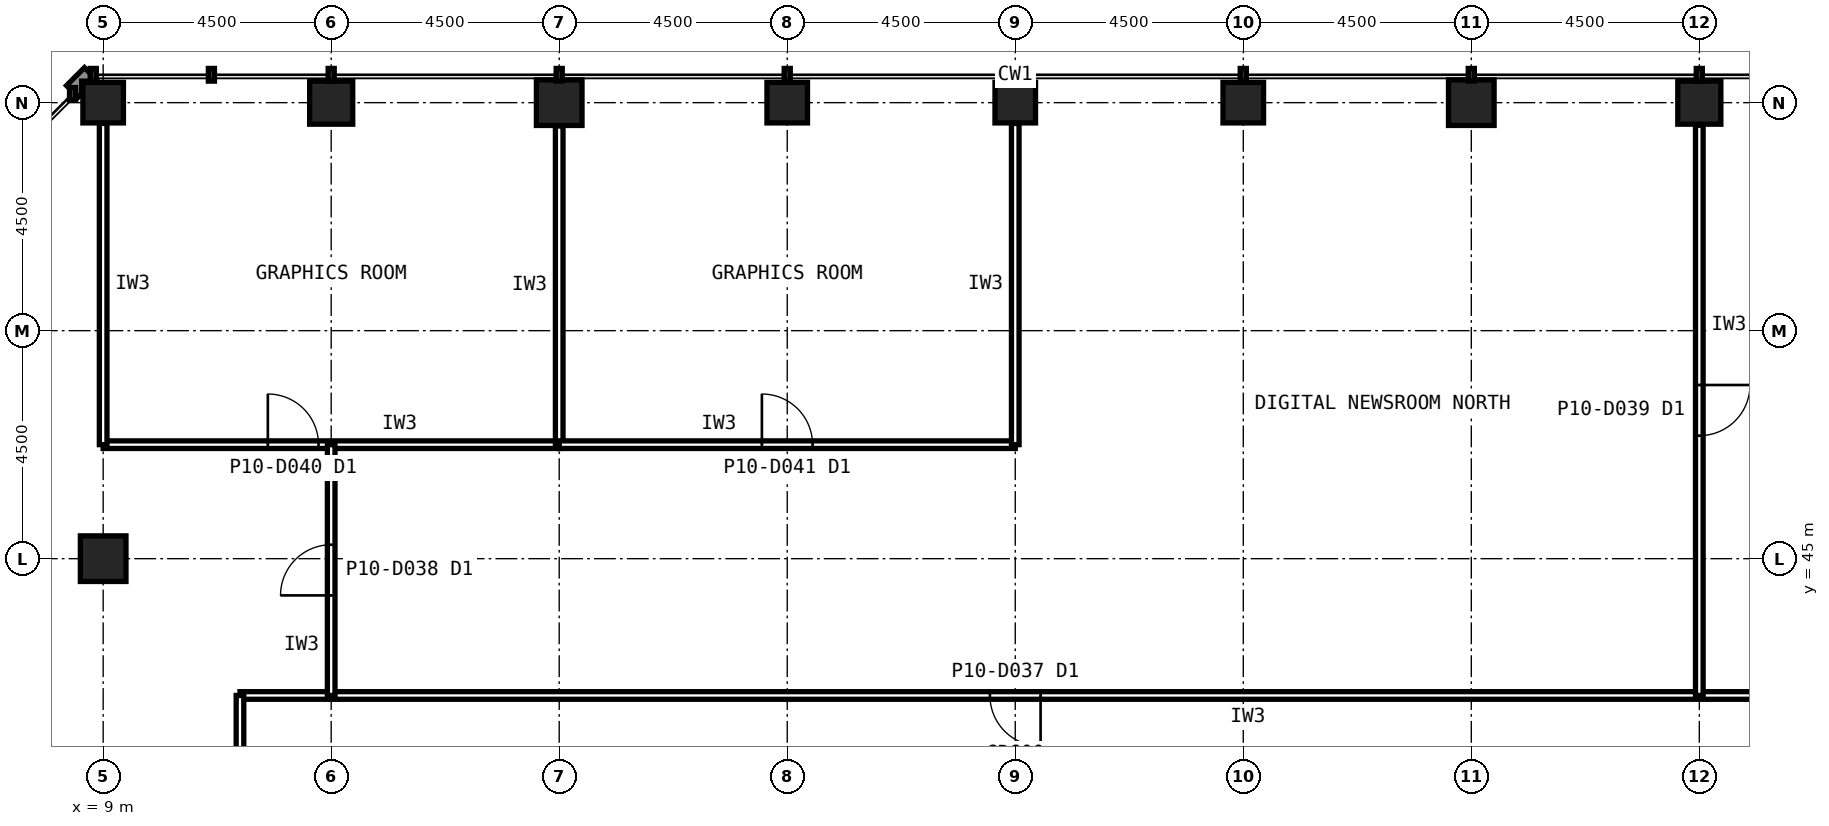
"""IFC4 building model, lengths in metres.
Left out: names, types, materials, properties, quantities, classifications, styles, units other than length and angle.
Written with IfcOpenShell. Run it as: python <this file> out.ifc"""

import sys

from ifc_helpers import new_model, si_unit, direction, frame, frame_2d, origin, origin_2d, place, context, subcontext, project, spatial, rectangle, hollow_rectangle, extrude, element, fill, save


model = new_model("IFC4")
c1 = context("Model", 3, precision=1e-05, world=origin(), true_north=direction((0.0, 1.0)))
c2 = subcontext(c1, "Body", "Model", "MODEL_VIEW")
j1 = project(units=[si_unit("LENGTHUNIT", "METRE"), si_unit("PLANEANGLEUNIT", "RADIAN")], contexts=[c1])
p1 = place(None, origin())
s1 = spatial("IfcSite", under=j1, at=p1, CompositionType="ELEMENT")
p2 = place(p1, origin())
s2 = spatial("IfcBuilding", under=s1, at=p2, CompositionType="ELEMENT")
p3 = place(p2, frame((0.0, 0.0, 45.8)))
s3 = spatial("IfcBuildingStorey", under=s2, at=p3, CompositionType="ELEMENT", Elevation=45.8)
p4 = place(p3, frame((40.5, 54.0, 0.0), z_axis=(0.0, 0.0, 1.0), x_axis=(1.0, 0.0, 0.0)))
e1 = element("IfcColumn", 1, at=p4, inside=s3, PredefinedType="COLUMN", context=c2, shape_type="SweptSolid", body=[
    extrude(hollow_rectangle(XDim=0.85, YDim=0.85, WallThickness=0.05, at=origin_2d()), origin(), (0.0, 0.0, 1.0), 4.2),
])
p5 = place(p3, frame((36.0, 54.0, 0.0), z_axis=(0.0, 0.0, 1.0), x_axis=(1.0, 0.0, 0.0)))
e2 = element("IfcColumn", 2, at=p5, inside=s3, PredefinedType="COLUMN", context=c2, shape_type="SweptSolid", body=[
    extrude(hollow_rectangle(XDim=0.9, YDim=0.9, WallThickness=0.063, at=origin_2d()), origin(), (0.0, 0.0, 1.0), 4.2),
])
for number, where, z_axis, x_axis in (
    (3, (31.5, 54.0, 0.0), (0.0, 0.0, 1.0), (1.0, 0.0, 0.0)),
    (4, (27.0, 54.0, 0.0), (0.0, 0.0, 1.0), (1.0, 0.0, 0.0)),
    (5, (22.5, 54.0, 0.0), (0.0, 0.0, 1.0), (1.0, 0.0, 0.0)),
):
    element("IfcColumn", number, at=place(p3, frame(where, z_axis=z_axis, x_axis=x_axis)), inside=s3, PredefinedType="COLUMN", context=c2, shape_type="SweptSolid", body=[
        extrude(hollow_rectangle(XDim=0.8, YDim=0.8, WallThickness=0.045, at=origin_2d()), origin(), (0.0, 0.0, 1.0), 4.2),
    ])
p6 = place(p3, frame((18.0, 54.0, 0.0), z_axis=(0.0, 0.0, 1.0), x_axis=(1.0, 0.0, 0.0)))
e6 = element("IfcColumn", 6, at=p6, inside=s3, PredefinedType="COLUMN", context=c2, shape_type="SweptSolid", body=[
    extrude(hollow_rectangle(XDim=0.9, YDim=0.9, WallThickness=0.063, at=origin_2d()), origin(), (0.0, 0.0, 1.0), 4.2),
])
p7 = place(p3, frame((13.5, 54.0, 0.0), z_axis=(0.0, 0.0, 1.0), x_axis=(1.0, 0.0, 0.0)))
e7 = element("IfcColumn", 7, at=p7, inside=s3, PredefinedType="COLUMN", context=c2, shape_type="SweptSolid", body=[
    extrude(hollow_rectangle(XDim=0.85, YDim=0.85, WallThickness=0.05, at=origin_2d()), origin(), (0.0, 0.0, 1.0), 4.2),
])
p8 = place(p3, frame((9.0, 54.0, 0.0), z_axis=(0.0, 0.0, 1.0), x_axis=(1.0, 0.0, 0.0)))
e8 = element("IfcColumn", 8, at=p8, inside=s3, PredefinedType="COLUMN", context=c2, shape_type="SweptSolid", body=[
    extrude(hollow_rectangle(XDim=0.8, YDim=0.8, WallThickness=0.045, at=origin_2d()), origin(), (0.0, 0.0, 1.0), 4.2),
])
p9 = place(p3, frame((9.0, 45.0, 0.0), z_axis=(0.0, 0.0, 1.0), x_axis=(1.0, 0.0, 0.0)))
e9 = element("IfcColumn", 9, at=p9, inside=s3, PredefinedType="COLUMN", context=c2, shape_type="SweptSolid", body=[
    extrude(hollow_rectangle(XDim=0.9, YDim=0.9, WallThickness=0.063, at=origin_2d()), origin(), (0.0, 0.0, 1.0), 4.2),
])
p10 = place(p3, frame((42.3, 42.3, 0.0), z_axis=(0.0, 0.0, 1.0), x_axis=(-1.0, 0.0, 0.0)))
e10 = element("IfcWall", 10, at=p10, inside=s3, PredefinedType="PARTITIONING", context=c2, shape_type="SweptSolid", body=[
    extrude(rectangle(XDim=30.6, YDim=0.15, at=frame_2d((15.3, 0.0))), origin(), (0.0, 0.0, 1.0), 4.04),
])
p11 = place(p10, frame((14.8, 0.0, 0.0)))
e11 = element("IfcOpeningElement", 11, at=p11, cuts=e10, PredefinedType="OPENING", context=c2, shape_type="SweptSolid", body=[
    extrude(rectangle(XDim=1.0, YDim=2.1, at=frame_2d((0.5, 1.05))), frame((0.0, 0.085, 0.0), z_axis=(0.0, -1.0, 0.0), x_axis=(1.0, 0.0, 0.0)), (0.0, 0.0, 1.0), 0.17),
])
p12 = place(p3, frame((11.7, 42.3, 0.0), z_axis=(0.0, 0.0, 1.0), x_axis=(0.0, -1.0, 0.0)))
e12 = element("IfcWall", 12, at=p12, inside=s3, PredefinedType="PARTITIONING", context=c2, shape_type="SweptSolid", body=[
    extrude(rectangle(XDim=9.0, YDim=0.15, at=frame_2d((4.5, 0.0))), origin(), (0.0, 0.0, 1.0), 4.04),
])
p13 = place(p3, frame((9.0, 47.25, 0.0), z_axis=(0.0, 0.0, 1.0), x_axis=(1.0, 0.0, 0.0)))
e13 = element("IfcWall", 13, at=p13, inside=s3, PredefinedType="PARTITIONING", context=c2, shape_type="SweptSolid", body=[
    extrude(rectangle(XDim=9.0, YDim=0.15, at=frame_2d((4.5, 0.0))), origin(), (0.0, 0.0, 1.0), 4.04),
])
p14 = place(p13, frame((3.25, 0.0, 0.0)))
e14 = element("IfcOpeningElement", 14, at=p14, cuts=e13, PredefinedType="OPENING", context=c2, shape_type="SweptSolid", body=[
    extrude(rectangle(XDim=1.0, YDim=2.1, at=frame_2d((0.5, 1.05))), frame((0.0, 0.085, 0.0), z_axis=(0.0, -1.0, 0.0), x_axis=(1.0, 0.0, 0.0)), (0.0, 0.0, 1.0), 0.17),
])
p15 = place(p3, frame((18.0, 47.25, 0.0), z_axis=(0.0, 0.0, 1.0), x_axis=(0.0, 1.0, 0.0)))
e15 = element("IfcWall", 15, at=p15, inside=s3, PredefinedType="PARTITIONING", context=c2, shape_type="SweptSolid", body=[
    extrude(rectangle(XDim=6.29, YDim=0.15, at=frame_2d((3.145, 0.0))), origin(), (0.0, 0.0, 1.0), 3.189),
])
p16 = place(p3, frame((9.0, 53.59, 0.0), z_axis=(0.0, 0.0, 1.0), x_axis=(0.0, -1.0, 0.0)))
e16 = element("IfcWall", 16, at=p16, inside=s3, PredefinedType="PARTITIONING", context=c2, shape_type="SweptSolid", body=[
    extrude(rectangle(XDim=6.34, YDim=0.15, at=frame_2d((3.17, 0.0))), origin(), (0.0, 0.0, 1.0), 3.429),
])
p17 = place(p3, frame((18.0, 47.25, 0.0), z_axis=(0.0, 0.0, 1.0), x_axis=(1.0, 0.0, 0.0)))
e17 = element("IfcWall", 17, at=p17, inside=s3, PredefinedType="PARTITIONING", context=c2, shape_type="SweptSolid", body=[
    extrude(rectangle(XDim=9.0, YDim=0.15, at=frame_2d((4.5, 0.0))), origin(), (0.0, 0.0, 1.0), 4.04),
])
p18 = place(p17, frame((4.0, 0.0, 0.0)))
e18 = element("IfcOpeningElement", 18, at=p18, cuts=e17, PredefinedType="OPENING", context=c2, shape_type="SweptSolid", body=[
    extrude(rectangle(XDim=1.0, YDim=2.1, at=frame_2d((0.5, 1.05))), frame((0.0, 0.085, 0.0), z_axis=(0.0, -1.0, 0.0), x_axis=(1.0, 0.0, 0.0)), (0.0, 0.0, 1.0), 0.17),
])
p19 = place(p3, frame((27.0, 47.25, 0.0), z_axis=(0.0, 0.0, 1.0), x_axis=(0.0, 1.0, 0.0)))
e19 = element("IfcWall", 19, at=p19, inside=s3, PredefinedType="PARTITIONING", context=c2, shape_type="SweptSolid", body=[
    extrude(rectangle(XDim=6.34, YDim=0.15, at=frame_2d((3.17, 0.0))), origin(), (0.0, 0.0, 1.0), 3.189),
])
p20 = place(p3, frame((40.5, 53.555, 0.0), z_axis=(0.0, 0.0, 1.0), x_axis=(0.0, -1.0, 0.0)))
e20 = element("IfcWall", 20, at=p20, inside=s3, PredefinedType="PARTITIONING", context=c2, shape_type="SweptSolid", body=[
    extrude(rectangle(XDim=11.255, YDim=0.15, at=frame_2d((5.627, 0.0))), origin(), (0.0, 0.0, 1.0), 3.189),
])
p21 = place(p20, frame((5.127, 0.0, 0.0)))
e21 = element("IfcOpeningElement", 21, at=p21, cuts=e20, PredefinedType="OPENING", context=c2, shape_type="SweptSolid", body=[
    extrude(rectangle(XDim=1.0, YDim=2.1, at=frame_2d((0.5, 1.05))), frame((0.0, 0.085, 0.0), z_axis=(0.0, -1.0, 0.0), x_axis=(1.0, 0.0, 0.0)), (0.0, 0.0, 1.0), 0.17),
])
p22 = place(p3, frame((13.5, 42.3, 0.0), z_axis=(0.0, 0.0, 1.0), x_axis=(0.0, 1.0, 0.0)))
e22 = element("IfcWall", 22, at=p22, inside=s3, PredefinedType="PARTITIONING", context=c2, shape_type="SweptSolid", body=[
    extrude(rectangle(XDim=4.95, YDim=0.15, at=frame_2d((2.475, 0.0))), origin(), (0.0, 0.0, 1.0), 3.189),
])
p23 = place(p22, frame((1.975, 0.0, 0.0)))
e23 = element("IfcOpeningElement", 23, at=p23, cuts=e22, PredefinedType="OPENING", context=c2, shape_type="SweptSolid", body=[
    extrude(rectangle(XDim=1.0, YDim=2.1, at=frame_2d((0.5, 1.05))), frame((0.0, 0.085, 0.0), z_axis=(0.0, -1.0, 0.0), x_axis=(1.0, 0.0, 0.0)), (0.0, 0.0, 1.0), 0.17),
])
p24 = place(p11, origin())
e24 = element("IfcDoor", 24, at=p24, inside=s3, OperationType="SINGLE_SWING_LEFT", PredefinedType="DOOR", context=c2, shape_type="SweptSolid", body=[
    extrude(rectangle(XDim=1.0, YDim=2.1, at=frame_2d((0.5, 1.05))), frame((0.0, 0.025, 0.0), z_axis=(0.0, -1.0, 0.0), x_axis=(1.0, 0.0, 0.0)), (0.0, 0.0, 1.0), 0.05),
])
fill(e11, e24)
p25 = place(p14, origin())
e25 = element("IfcDoor", 25, at=p25, inside=s3, OperationType="SINGLE_SWING_LEFT", PredefinedType="DOOR", context=c2, shape_type="SweptSolid", body=[
    extrude(rectangle(XDim=1.0, YDim=2.1, at=frame_2d((0.5, 1.05))), frame((0.0, 0.025, 0.0), z_axis=(0.0, -1.0, 0.0), x_axis=(1.0, 0.0, 0.0)), (0.0, 0.0, 1.0), 0.05),
])
fill(e14, e25)
p26 = place(p18, origin())
e26 = element("IfcDoor", 26, at=p26, inside=s3, OperationType="SINGLE_SWING_LEFT", PredefinedType="DOOR", context=c2, shape_type="SweptSolid", body=[
    extrude(rectangle(XDim=1.0, YDim=2.1, at=frame_2d((0.5, 1.05))), frame((0.0, 0.025, 0.0), z_axis=(0.0, -1.0, 0.0), x_axis=(1.0, 0.0, 0.0)), (0.0, 0.0, 1.0), 0.05),
])
fill(e18, e26)
p27 = place(p21, origin())
e27 = element("IfcDoor", 27, at=p27, inside=s3, OperationType="SINGLE_SWING_LEFT", PredefinedType="DOOR", context=c2, shape_type="SweptSolid", body=[
    extrude(rectangle(XDim=1.0, YDim=2.1, at=frame_2d((0.5, 1.05))), frame((0.0, 0.025, 0.0), z_axis=(0.0, -1.0, 0.0), x_axis=(1.0, 0.0, 0.0)), (0.0, 0.0, 1.0), 0.05),
])
fill(e21, e27)
p28 = place(p23, origin())
e28 = element("IfcDoor", 28, at=p28, inside=s3, OperationType="SINGLE_SWING_LEFT", PredefinedType="DOOR", context=c2, shape_type="SweptSolid", body=[
    extrude(rectangle(XDim=1.0, YDim=2.1, at=frame_2d((0.5, 1.05))), frame((0.0, 0.025, 0.0), z_axis=(0.0, -1.0, 0.0), x_axis=(1.0, 0.0, 0.0)), (0.0, 0.0, 1.0), 0.05),
])
fill(e23, e28)
save(model, sys.argv[1])
